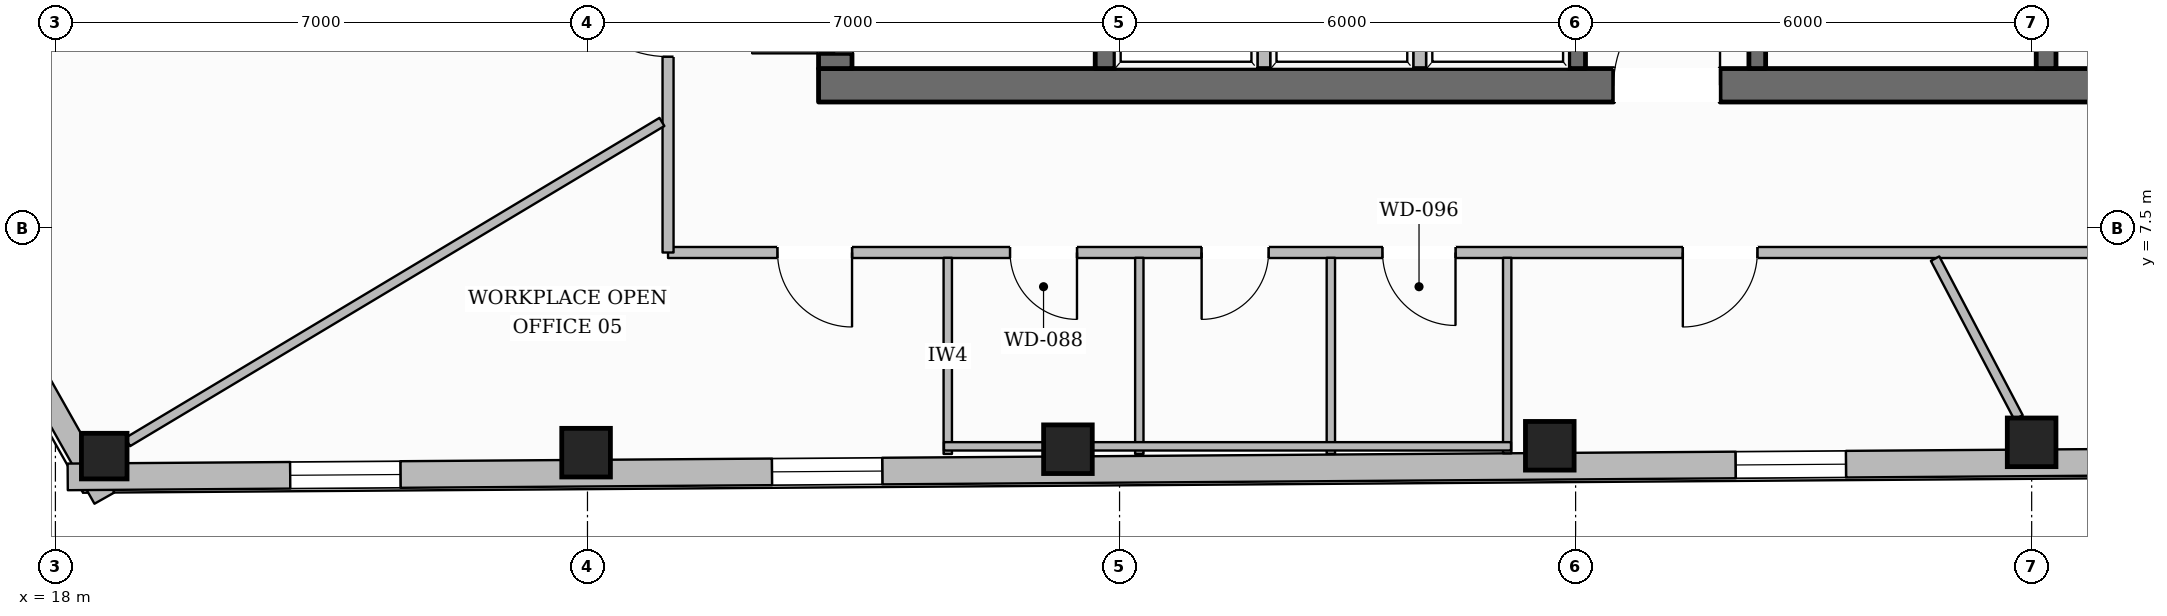
"""IFC4 building model, lengths in metres.
Left out: names, types, materials, properties, quantities, classifications, styles, units other than length and angle.
Written with IfcOpenShell. Run it as: python <this file> out.ifc"""

import sys

from ifc_helpers import new_model, si_unit, direction, frame, frame_2d, origin, origin_2d, place, context, subcontext, project, spatial, rectangle, hollow_rectangle, extrude, element, fill, save


model = new_model("IFC4")
c1 = context("Model", 3, precision=1e-05, world=origin(), true_north=direction((0.0, 1.0)))
c2 = subcontext(c1, "Body", "Model", "MODEL_VIEW")
j1 = project(units=[si_unit("LENGTHUNIT", "METRE"), si_unit("PLANEANGLEUNIT", "RADIAN")], contexts=[c1])
p1 = place(None, origin())
s1 = spatial("IfcSite", under=j1, at=p1, CompositionType="ELEMENT")
p2 = place(p1, origin())
s2 = spatial("IfcBuilding", under=s1, at=p2, CompositionType="ELEMENT")
p3 = place(p2, frame((0.0, 0.0, 226.6)))
s3 = spatial("IfcBuildingStorey", under=s2, at=p3, CompositionType="ELEMENT", Elevation=226.6)
p4 = place(p3, frame((28.04, 9.38, 0.0), z_axis=(0.0, 0.0, 1.0), x_axis=(1.0, 0.0, 0.0)))
e1 = element("IfcWall", 1, at=p4, inside=s3, PredefinedType="SOLIDWALL", context=c2, shape_type="SweptSolid", body=[
    extrude(rectangle(XDim=19.92, YDim=0.44, at=frame_2d((9.96, 0.0))), origin(), (0.0, 0.0, 1.0), 3.6),
])
p5 = place(p4, frame((10.46, 0.0, 0.0)))
e2 = element("IfcOpeningElement", 2, at=p5, cuts=e1, PredefinedType="OPENING", context=c2, shape_type="SweptSolid", body=[
    extrude(rectangle(XDim=1.4, YDim=2.2, at=frame_2d((0.7, 1.1))), frame((0.0, 0.23, 0.0), z_axis=(0.0, -1.0, 0.0), x_axis=(1.0, 0.0, 0.0)), (0.0, 0.0, 1.0), 0.46),
])
p6 = place(p3, frame((28.26, 9.6, 0.0), z_axis=(0.0, 0.0, 1.0), x_axis=(0.0, 1.0, 0.0)))
e3 = element("IfcWall", 3, at=p6, inside=s3, PredefinedType="SOLIDWALL", context=c2, shape_type="SweptSolid", body=[
    extrude(rectangle(XDim=13.0, YDim=0.44, at=frame_2d((6.5, 0.0))), origin(), (0.0, 0.0, 1.0), 3.6),
])
p7 = place(p6, frame((0.2, 0.0, 0.0)))
e4 = element("IfcOpeningElement", 4, at=p7, cuts=e3, PredefinedType="OPENING", context=c2, shape_type="SweptSolid", body=[
    extrude(rectangle(XDim=1.1, YDim=2.15, at=frame_2d((0.55, 1.075))), frame((0.0, 0.23, 0.0), z_axis=(0.0, -1.0, 0.0), x_axis=(1.0, 0.0, 0.0)), (0.0, 0.0, 1.0), 0.46),
])
p8 = place(p6, frame((8.4, 0.0, 0.0)))
e5 = element("IfcOpeningElement", 5, at=p8, cuts=e3, PredefinedType="OPENING", context=c2, shape_type="SweptSolid", body=[
    extrude(rectangle(XDim=0.9, YDim=2.1, at=frame_2d((0.45, 1.05))), frame((0.0, 0.23, 0.0), z_axis=(0.0, -1.0, 0.0), x_axis=(1.0, 0.0, 0.0)), (0.0, 0.0, 1.0), 0.46),
])
p9 = place(p3, frame((31.81, 9.6, 0.0), z_axis=(0.0, 0.0, 1.0), x_axis=(0.0, 1.0, 0.0)))
e6 = element("IfcWall", 6, at=p9, inside=s3, PredefinedType="SHEAR", context=c2, shape_type="SweptSolid", body=[
    extrude(rectangle(XDim=13.0, YDim=0.26, at=frame_2d((6.5, 0.0))), origin(), (0.0, 0.0, 1.0), 3.6),
])
p10 = place(p9, frame((10.925, 0.0, 0.0)))
e7 = element("IfcOpeningElement", 7, at=p10, cuts=e6, PredefinedType="OPENING", context=c2, shape_type="SweptSolid", body=[
    extrude(rectangle(XDim=1.25, YDim=2.25, at=frame_2d((0.625, 1.125))), frame((0.0, 0.14, 0.0), z_axis=(0.0, -1.0, 0.0), x_axis=(1.0, 0.0, 0.0)), (0.0, 0.0, 1.0), 0.28),
])
p11 = place(p3, frame((44.19, 9.6, 0.0), z_axis=(0.0, 0.0, 1.0), x_axis=(0.0, 1.0, 0.0)))
e8 = element("IfcWall", 8, at=p11, inside=s3, PredefinedType="SHEAR", context=c2, shape_type="SweptSolid", body=[
    extrude(rectangle(XDim=13.0, YDim=0.26, at=frame_2d((6.5, 0.0))), origin(), (0.0, 0.0, 1.0), 3.6),
])
p12 = place(p11, frame((10.925, 0.0, 0.0)))
e9 = element("IfcOpeningElement", 9, at=p12, cuts=e8, PredefinedType="OPENING", context=c2, shape_type="SweptSolid", body=[
    extrude(rectangle(XDim=1.25, YDim=2.25, at=frame_2d((0.625, 1.125))), frame((0.0, 0.14, 0.0), z_axis=(0.0, -1.0, 0.0), x_axis=(1.0, 0.0, 0.0)), (0.0, 0.0, 1.0), 0.28),
])
for number, where, z_axis, x_axis in (
    (10, (38.02, 9.6, 0.0), (0.0, 0.0, 1.0), (0.0, 1.0, 0.0)),
    (11, (40.39, 9.6, 0.0), (0.0, 0.0, 1.0), (0.0, 1.0, 0.0)),
):
    element("IfcWall", number, at=place(p3, frame(where, z_axis=z_axis, x_axis=x_axis)), inside=s3, PredefinedType="SOLIDWALL", context=c2, shape_type="SweptSolid", body=[
        extrude(rectangle(XDim=2.24, YDim=0.22, at=frame_2d((1.12, 0.0))), origin(), (0.0, 0.0, 1.0), 3.6),
    ])
p13 = place(p3, frame((18.642, 4.501, 0.0), z_axis=(0.0, 0.0, 1.0), x_axis=(1.0, 0.0, 0.0)))
e12 = element("IfcColumn", 12, at=p13, inside=s3, PredefinedType="COLUMN", context=c2, shape_type="SweptSolid", body=[
    extrude(hollow_rectangle(XDim=0.6, YDim=0.6, WallThickness=0.028, at=origin_2d()), origin(), (0.0, 0.0, 1.0), 3.6),
])
for number, where, z_axis, x_axis in (
    (13, (24.982, 4.547, 0.0), (0.0, 0.0, 1.0), (1.0, 0.0, 0.0)),
    (14, (31.321, 4.592, 0.0), (0.0, 0.0, 1.0), (1.0, 0.0, 0.0)),
    (15, (37.66, 4.637, 0.0), (0.0, 0.0, 1.0), (1.0, 0.0, 0.0)),
    (16, (44.0, 4.683, 0.0), (0.0, 0.0, 1.0), (1.0, 0.0, 0.0)),
):
    element("IfcColumn", number, at=place(p3, frame(where, z_axis=z_axis, x_axis=x_axis)), inside=s3, PredefinedType="COLUMN", context=c2, shape_type="SweptSolid", body=[
        extrude(hollow_rectangle(XDim=0.64, YDim=0.64, WallThickness=0.028, at=origin_2d()), origin(), (0.0, 0.0, 1.0), 3.6),
    ])
p14 = place(p3, frame((18.645, 3.948, 0.0), z_axis=(0.0, 0.0, 1.0), x_axis=(-0.491548081962, 0.870850436711, 0.0)))
e17 = element("IfcWall", 17, at=p14, inside=s3, PredefinedType="STANDARD", context=c2, shape_type="SweptSolid", body=[
    extrude(rectangle(XDim=8.581, YDim=0.3, at=frame_2d((4.29, 0.0))), origin(), (0.0, 0.0, 1.0), 3.132),
])
p15 = place(p14, frame((3.765, 0.0, 0.65)))
e18 = element("IfcOpeningElement", 18, at=p15, cuts=e17, PredefinedType="OPENING", context=c2, shape_type="SweptSolid", body=[
    extrude(rectangle(XDim=1.05, YDim=1.7, at=frame_2d((0.525, 0.85))), frame((0.0, 0.16, 0.0), z_axis=(0.0, -1.0, 0.0), x_axis=(1.0, 0.0, 0.0)), (0.0, 0.0, 1.0), 0.32),
])
p16 = place(p3, frame((57.156, 4.507, 0.0), z_axis=(0.0, 0.0, 1.0), x_axis=(-0.999974484064, -0.007143614012, 0.0)))
e19 = element("IfcWall", 19, at=p16, inside=s3, PredefinedType="STANDARD", context=c2, shape_type="SweptSolid", body=[
    extrude(rectangle(XDim=38.995, YDim=0.35, at=frame_2d((19.498, 0.0))), origin(), (0.0, 0.0, 1.0), 3.132),
])
p17 = place(p16, frame((34.618, 0.0, 0.65)))
e20 = element("IfcOpeningElement", 20, at=p17, cuts=e19, PredefinedType="OPENING", context=c2, shape_type="SweptSolid", body=[
    extrude(rectangle(XDim=1.45, YDim=1.75, at=frame_2d((0.725, 0.875))), frame((0.0, 0.185, 0.0), z_axis=(0.0, -1.0, 0.0), x_axis=(1.0, 0.0, 0.0)), (0.0, 0.0, 1.0), 0.37),
])
p18 = place(p16, frame((28.278, 0.0, 0.65)))
e21 = element("IfcOpeningElement", 21, at=p18, cuts=e19, PredefinedType="OPENING", context=c2, shape_type="SweptSolid", body=[
    extrude(rectangle(XDim=1.45, YDim=1.75, at=frame_2d((0.725, 0.875))), frame((0.0, 0.185, 0.0), z_axis=(0.0, -1.0, 0.0), x_axis=(1.0, 0.0, 0.0)), (0.0, 0.0, 1.0), 0.37),
])
p19 = place(p16, frame((15.599, 0.0, 0.65)))
e22 = element("IfcOpeningElement", 22, at=p19, cuts=e19, PredefinedType="OPENING", context=c2, shape_type="SweptSolid", body=[
    extrude(rectangle(XDim=1.45, YDim=1.75, at=frame_2d((0.725, 0.875))), frame((0.0, 0.185, 0.0), z_axis=(0.0, -1.0, 0.0), x_axis=(1.0, 0.0, 0.0)), (0.0, 0.0, 1.0), 0.37),
])
p20 = place(p16, frame((9.26, 0.0, 0.65)))
e23 = element("IfcOpeningElement", 23, at=p20, cuts=e19, PredefinedType="OPENING", context=c2, shape_type="SweptSolid", body=[
    extrude(rectangle(XDim=1.45, YDim=1.75, at=frame_2d((0.725, 0.875))), frame((0.0, 0.185, 0.0), z_axis=(0.0, -1.0, 0.0), x_axis=(1.0, 0.0, 0.0)), (0.0, 0.0, 1.0), 0.37),
])
p21 = place(p16, frame((2.92, 0.0, 0.65)))
e24 = element("IfcOpeningElement", 24, at=p21, cuts=e19, PredefinedType="OPENING", context=c2, shape_type="SweptSolid", body=[
    extrude(rectangle(XDim=1.45, YDim=1.75, at=frame_2d((0.725, 0.875))), frame((0.0, 0.185, 0.0), z_axis=(0.0, -1.0, 0.0), x_axis=(1.0, 0.0, 0.0)), (0.0, 0.0, 1.0), 0.37),
])
for number, where, z_axis, x_axis in (
    (25, (33.9, 9.52, 0.0), (0.0, 0.0, 1.0), (0.0, 1.0, 0.0)),
    (26, (35.95, 9.52, 0.0), (0.0, 0.0, 1.0), (0.0, 1.0, 0.0)),
):
    element("IfcWall", number, at=place(p3, frame(where, z_axis=z_axis, x_axis=x_axis)), inside=s3, PredefinedType="PARTITIONING", context=c2, shape_type="SweptSolid", body=[
        extrude(rectangle(XDim=2.32, YDim=0.165, at=frame_2d((1.16, 0.0))), origin(), (0.0, 0.0, 1.0), 3.6),
    ])
p22 = place(p3, frame((49.94, 7.18, 0.0), z_axis=(0.0, 0.0, 1.0), x_axis=(-1.0, 0.0, 0.0)))
e27 = element("IfcWall", 27, at=p22, inside=s3, PredefinedType="PARTITIONING", context=c2, shape_type="SweptSolid", body=[
    extrude(rectangle(XDim=23.88, YDim=0.145, at=frame_2d((11.94, 0.0))), origin(), (0.0, 0.0, 1.0), 3.339),
])
p23 = place(p22, frame((18.5, 0.0, 0.0)))
e28 = element("IfcOpeningElement", 28, at=p23, cuts=e27, PredefinedType="OPENING", context=c2, shape_type="SweptSolid", body=[
    extrude(rectangle(XDim=0.88, YDim=2.1, at=frame_2d((0.44, 1.05))), frame((0.0, 0.083, 0.0), z_axis=(0.0, -1.0, 0.0), x_axis=(1.0, 0.0, 0.0)), (0.0, 0.0, 1.0), 0.165),
])
p24 = place(p22, frame((15.98, 0.0, 0.0)))
e29 = element("IfcOpeningElement", 29, at=p24, cuts=e27, PredefinedType="OPENING", context=c2, shape_type="SweptSolid", body=[
    extrude(rectangle(XDim=0.88, YDim=2.1, at=frame_2d((0.44, 1.05))), frame((0.0, 0.083, 0.0), z_axis=(0.0, -1.0, 0.0), x_axis=(1.0, 0.0, 0.0)), (0.0, 0.0, 1.0), 0.165),
])
p25 = place(p22, frame((13.52, 0.0, 0.0)))
e30 = element("IfcOpeningElement", 30, at=p25, cuts=e27, PredefinedType="OPENING", context=c2, shape_type="SweptSolid", body=[
    extrude(rectangle(XDim=0.96, YDim=2.1, at=frame_2d((0.48, 1.05))), frame((0.0, 0.083, 0.0), z_axis=(0.0, -1.0, 0.0), x_axis=(1.0, 0.0, 0.0)), (0.0, 0.0, 1.0), 0.165),
])
p26 = place(p22, frame((21.459, 0.0, 0.0)))
e31 = element("IfcOpeningElement", 31, at=p26, cuts=e27, PredefinedType="OPENING", context=c2, shape_type="SweptSolid", body=[
    extrude(rectangle(XDim=0.98, YDim=2.15, at=frame_2d((0.49, 1.075))), frame((0.0, 0.083, 0.0), z_axis=(0.0, -1.0, 0.0), x_axis=(1.0, 0.0, 0.0)), (0.0, 0.0, 1.0), 0.165),
])
p27 = place(p22, frame((9.549, 0.0, 0.0)))
e32 = element("IfcOpeningElement", 32, at=p27, cuts=e27, PredefinedType="OPENING", context=c2, shape_type="SweptSolid", body=[
    extrude(rectangle(XDim=0.98, YDim=2.15, at=frame_2d((0.49, 1.075))), frame((0.0, 0.083, 0.0), z_axis=(0.0, -1.0, 0.0), x_axis=(1.0, 0.0, 0.0)), (0.0, 0.0, 1.0), 0.165),
])
p28 = place(p3, frame((26.06, 7.18, 0.0), z_axis=(0.0, 0.0, 1.0), x_axis=(0.0, 1.0, 0.0)))
e33 = element("IfcWall", 33, at=p28, inside=s3, PredefinedType="PARTITIONING", context=c2, shape_type="SweptSolid", body=[
    extrude(rectangle(XDim=4.97, YDim=0.145, at=frame_2d((2.485, 0.0))), origin(), (0.0, 0.0, 1.0), 3.6),
])
p29 = place(p28, frame((2.577, 0.0, 0.0)))
e34 = element("IfcOpeningElement", 34, at=p29, cuts=e33, PredefinedType="OPENING", context=c2, shape_type="SweptSolid", body=[
    extrude(rectangle(XDim=1.4, YDim=2.2, at=frame_2d((0.7, 1.1))), frame((0.0, 0.083, 0.0), z_axis=(0.0, -1.0, 0.0), x_axis=(1.0, 0.0, 0.0)), (0.0, 0.0, 1.0), 0.165),
])
for number, where, z_axis, x_axis in (
    (35, (29.74, 4.53, 0.0), (0.0, 0.0, 1.0), (0.0, 1.0, 0.0)),
    (36, (32.26, 4.53, 0.0), (0.0, 0.0, 1.0), (0.0, 1.0, 0.0)),
    (37, (34.78, 4.53, 0.0), (0.0, 0.0, 1.0), (0.0, 1.0, 0.0)),
):
    element("IfcWall", number, at=place(p3, frame(where, z_axis=z_axis, x_axis=x_axis)), inside=s3, PredefinedType="PLUMBINGWALL", context=c2, shape_type="SweptSolid", body=[
        extrude(rectangle(XDim=2.58, YDim=0.11, at=frame_2d((1.29, 0.0))), origin(), (0.0, 0.0, 1.0), 3.6),
    ])
p30 = place(p3, frame((37.1, 4.538, 0.0), z_axis=(0.0, 0.0, 1.0), x_axis=(0.0, 1.0, 0.0)))
e38 = element("IfcWall", 38, at=p30, inside=s3, PredefinedType="PLUMBINGWALL", context=c2, shape_type="SweptSolid", body=[
    extrude(rectangle(XDim=2.572, YDim=0.11, at=frame_2d((1.286, 0.0))), origin(), (0.0, 0.0, 1.0), 3.6),
])
p31 = place(p3, frame((29.69, 4.63, 0.0), z_axis=(0.0, 0.0, 1.0), x_axis=(1.0, 0.0, 0.0)))
e39 = element("IfcWall", 39, at=p31, inside=s3, PredefinedType="PLUMBINGWALL", context=c2, shape_type="SweptSolid", body=[
    extrude(rectangle(XDim=7.46, YDim=0.11, at=frame_2d((3.73, 0.0))), origin(), (0.0, 0.0, 1.0), 3.135),
])
p32 = place(p3, frame((25.979, 8.898, 0.0), z_axis=(0.0, 0.0, 1.0), x_axis=(-0.857802979385, -0.513978646013, 0.0)))
e40 = element("IfcWall", 40, at=p32, inside=s3, PredefinedType="PARTITIONING", context=c2, shape_type="SweptSolid", body=[
    extrude(rectangle(XDim=8.194, YDim=0.125, at=frame_2d((4.097, 0.0))), origin(), (0.0, 0.0, 1.0), 3.141),
])
p33 = place(p3, frame((42.729, 7.1, 0.0), z_axis=(0.0, 0.0, 1.0), x_axis=(0.465166405425, -0.885223257299, 0.0)))
e41 = element("IfcWall", 41, at=p33, inside=s3, PredefinedType="PARTITIONING", context=c2, shape_type="SweptSolid", body=[
    extrude(rectangle(XDim=2.36, YDim=0.125, at=frame_2d((1.18, 0.0))), origin(), (0.0, 0.0, 1.0), 3.6),
])
p34 = place(p17, origin())
e42 = element("IfcWindow", 42, at=p34, inside=s3, PartitioningType="SINGLE_PANEL", PredefinedType="WINDOW", context=c2, shape_type="SweptSolid", body=[
    extrude(rectangle(XDim=1.45, YDim=1.75, at=frame_2d((0.725, 0.875))), frame((0.0, 0.03, 0.0), z_axis=(0.0, -1.0, 0.0), x_axis=(1.0, 0.0, 0.0)), (0.0, 0.0, 1.0), 0.06),
])
fill(e20, e42)
p35 = place(p18, origin())
e43 = element("IfcWindow", 43, at=p35, inside=s3, PartitioningType="SINGLE_PANEL", PredefinedType="WINDOW", context=c2, shape_type="SweptSolid", body=[
    extrude(rectangle(XDim=1.45, YDim=1.75, at=frame_2d((0.725, 0.875))), frame((0.0, 0.03, 0.0), z_axis=(0.0, -1.0, 0.0), x_axis=(1.0, 0.0, 0.0)), (0.0, 0.0, 1.0), 0.06),
])
fill(e21, e43)
p36 = place(p19, origin())
e44 = element("IfcWindow", 44, at=p36, inside=s3, PartitioningType="SINGLE_PANEL", PredefinedType="WINDOW", context=c2, shape_type="SweptSolid", body=[
    extrude(rectangle(XDim=1.45, YDim=1.75, at=frame_2d((0.725, 0.875))), frame((0.0, 0.03, 0.0), z_axis=(0.0, -1.0, 0.0), x_axis=(1.0, 0.0, 0.0)), (0.0, 0.0, 1.0), 0.06),
])
fill(e22, e44)
p37 = place(p7, origin())
e45 = element("IfcDoor", 45, at=p37, inside=s3, OperationType="SINGLE_SWING_LEFT", PredefinedType="DOOR", context=c2, shape_type="SweptSolid", body=[
    extrude(rectangle(XDim=1.1, YDim=2.15, at=frame_2d((0.55, 1.075))), frame((0.0, 0.025, 0.0), z_axis=(0.0, -1.0, 0.0), x_axis=(1.0, 0.0, 0.0)), (0.0, 0.0, 1.0), 0.05),
])
fill(e4, e45)
p38 = place(p5, origin())
e46 = element("IfcDoor", 46, at=p38, inside=s3, OperationType="SINGLE_SWING_RIGHT", PredefinedType="DOOR", context=c2, shape_type="SweptSolid", body=[
    extrude(rectangle(XDim=1.4, YDim=2.2, at=frame_2d((0.7, 1.1))), frame((0.0, 0.025, 0.0), z_axis=(0.0, -1.0, 0.0), x_axis=(1.0, 0.0, 0.0)), (0.0, 0.0, 1.0), 0.05),
])
fill(e2, e46)
p39 = place(p23, origin())
e47 = element("IfcDoor", 47, at=p39, inside=s3, OperationType="SINGLE_SWING_LEFT", PredefinedType="DOOR", context=c2, shape_type="SweptSolid", body=[
    extrude(rectangle(XDim=0.88, YDim=2.1, at=frame_2d((0.44, 1.05))), frame((0.0, 0.025, 0.0), z_axis=(0.0, -1.0, 0.0), x_axis=(1.0, 0.0, 0.0)), (0.0, 0.0, 1.0), 0.05),
])
fill(e28, e47)
p40 = place(p24, origin())
e48 = element("IfcDoor", 48, at=p40, inside=s3, OperationType="SINGLE_SWING_RIGHT", PredefinedType="DOOR", context=c2, shape_type="SweptSolid", body=[
    extrude(rectangle(XDim=0.88, YDim=2.1, at=frame_2d((0.44, 1.05))), frame((0.0, 0.025, 0.0), z_axis=(0.0, -1.0, 0.0), x_axis=(1.0, 0.0, 0.0)), (0.0, 0.0, 1.0), 0.05),
])
fill(e29, e48)
p41 = place(p25, origin())
e49 = element("IfcDoor", 49, at=p41, inside=s3, OperationType="SINGLE_SWING_LEFT", PredefinedType="DOOR", context=c2, shape_type="SweptSolid", body=[
    extrude(rectangle(XDim=0.96, YDim=2.1, at=frame_2d((0.48, 1.05))), frame((0.0, 0.025, 0.0), z_axis=(0.0, -1.0, 0.0), x_axis=(1.0, 0.0, 0.0)), (0.0, 0.0, 1.0), 0.05),
])
fill(e30, e49)
p42 = place(p29, origin())
e50 = element("IfcDoor", 50, at=p42, inside=s3, OperationType="SINGLE_SWING_RIGHT", PredefinedType="DOOR", context=c2, shape_type="SweptSolid", body=[
    extrude(rectangle(XDim=1.4, YDim=2.2, at=frame_2d((0.7, 1.1))), frame((0.0, 0.025, 0.0), z_axis=(0.0, -1.0, 0.0), x_axis=(1.0, 0.0, 0.0)), (0.0, 0.0, 1.0), 0.05),
])
fill(e34, e50)
p43 = place(p26, origin())
e51 = element("IfcDoor", 51, at=p43, inside=s3, OperationType="SINGLE_SWING_LEFT", PredefinedType="DOOR", context=c2, shape_type="SweptSolid", body=[
    extrude(rectangle(XDim=0.98, YDim=2.15, at=frame_2d((0.49, 1.075))), frame((0.0, 0.025, 0.0), z_axis=(0.0, -1.0, 0.0), x_axis=(1.0, 0.0, 0.0)), (0.0, 0.0, 1.0), 0.05),
])
fill(e31, e51)
p44 = place(p27, origin())
e52 = element("IfcDoor", 52, at=p44, inside=s3, OperationType="SINGLE_SWING_RIGHT", PredefinedType="DOOR", context=c2, shape_type="SweptSolid", body=[
    extrude(rectangle(XDim=0.98, YDim=2.15, at=frame_2d((0.49, 1.075))), frame((0.0, 0.025, 0.0), z_axis=(0.0, -1.0, 0.0), x_axis=(1.0, 0.0, 0.0)), (0.0, 0.0, 1.0), 0.05),
])
fill(e32, e52)
save(model, sys.argv[1])
